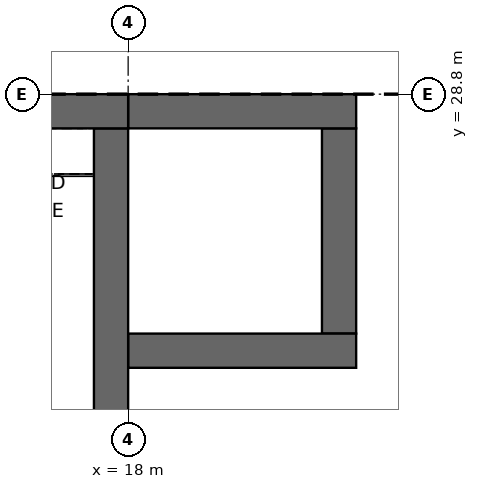
"""IFC4 building model, lengths in metres.
Left out: names, types, materials, properties, quantities, classifications, styles, units other than length and angle.
Written with IfcOpenShell. Run it as: python <this file> out.ifc"""

import sys

from ifc_helpers import new_model, si_unit, direction, frame, frame_2d, origin, place, context, subcontext, project, spatial, rectangle, extrude, element, save


model = new_model("IFC4")
c1 = context("Model", 3, precision=1e-05, world=origin(), true_north=direction((0.0, 1.0)))
c2 = subcontext(c1, "Body", "Model", "MODEL_VIEW")
j1 = project(units=[si_unit("LENGTHUNIT", "METRE"), si_unit("PLANEANGLEUNIT", "RADIAN")], contexts=[c1])
p1 = place(None, origin())
s1 = spatial("IfcSite", under=j1, at=p1, CompositionType="ELEMENT")
p2 = place(p1, origin())
s2 = spatial("IfcBuilding", under=s1, at=p2, CompositionType="ELEMENT")
p3 = place(p2, frame((0.0, 0.0, 4.2)))
s3 = spatial("IfcBuildingStorey", under=s2, at=p3, CompositionType="ELEMENT", Elevation=4.2)
p4 = place(p3, frame((12.0, 28.575, 0.0), z_axis=(0.0, 0.0, 1.0), x_axis=(1.0, 0.0, 0.0)))
e1 = element("IfcWall", 1, at=p4, inside=s3, PredefinedType="SHEAR", context=c2, shape_type="SweptSolid", body=[
    extrude(rectangle(XDim=6.0, YDim=0.45, at=frame_2d((3.0, 0.0))), origin(), (0.0, 0.0, 1.0), 3.75),
])
p5 = place(p3, frame((17.775, 22.1, 0.0), z_axis=(0.0, 0.0, 1.0), x_axis=(0.0, 1.0, 0.0)))
e2 = element("IfcWall", 2, at=p5, inside=s3, PredefinedType="SHEAR", context=c2, shape_type="SweptSolid", body=[
    extrude(rectangle(XDim=6.25, YDim=0.45, at=frame_2d((3.125, 0.0))), origin(), (0.0, 0.0, 1.0), 3.75),
])
for number, where, z_axis, x_axis in (
    (3, (18.0, 25.425, 0.0), (0.0, 0.0, 1.0), (1.0, 0.0, 0.0)),
    (4, (18.0, 28.575, 0.0), (0.0, 0.0, 1.0), (1.0, 0.0, 0.0)),
):
    element("IfcWall", number, at=place(p3, frame(where, z_axis=z_axis, x_axis=x_axis)), inside=s3, PredefinedType="SHEAR", context=c2, shape_type="SweptSolid", body=[
        extrude(rectangle(XDim=3.0, YDim=0.45, at=frame_2d((1.5, 0.0))), origin(), (0.0, 0.0, 1.0), 4.2),
    ])
p6 = place(p3, frame((20.775, 25.65, 0.0), z_axis=(0.0, 0.0, 1.0), x_axis=(0.0, 1.0, 0.0)))
e5 = element("IfcWall", 5, at=p6, inside=s3, PredefinedType="SHEAR", context=c2, shape_type="SweptSolid", body=[
    extrude(rectangle(XDim=2.7, YDim=0.45, at=frame_2d((1.35, 0.0))), origin(), (0.0, 0.0, 1.0), 4.2),
])
save(model, sys.argv[1])
